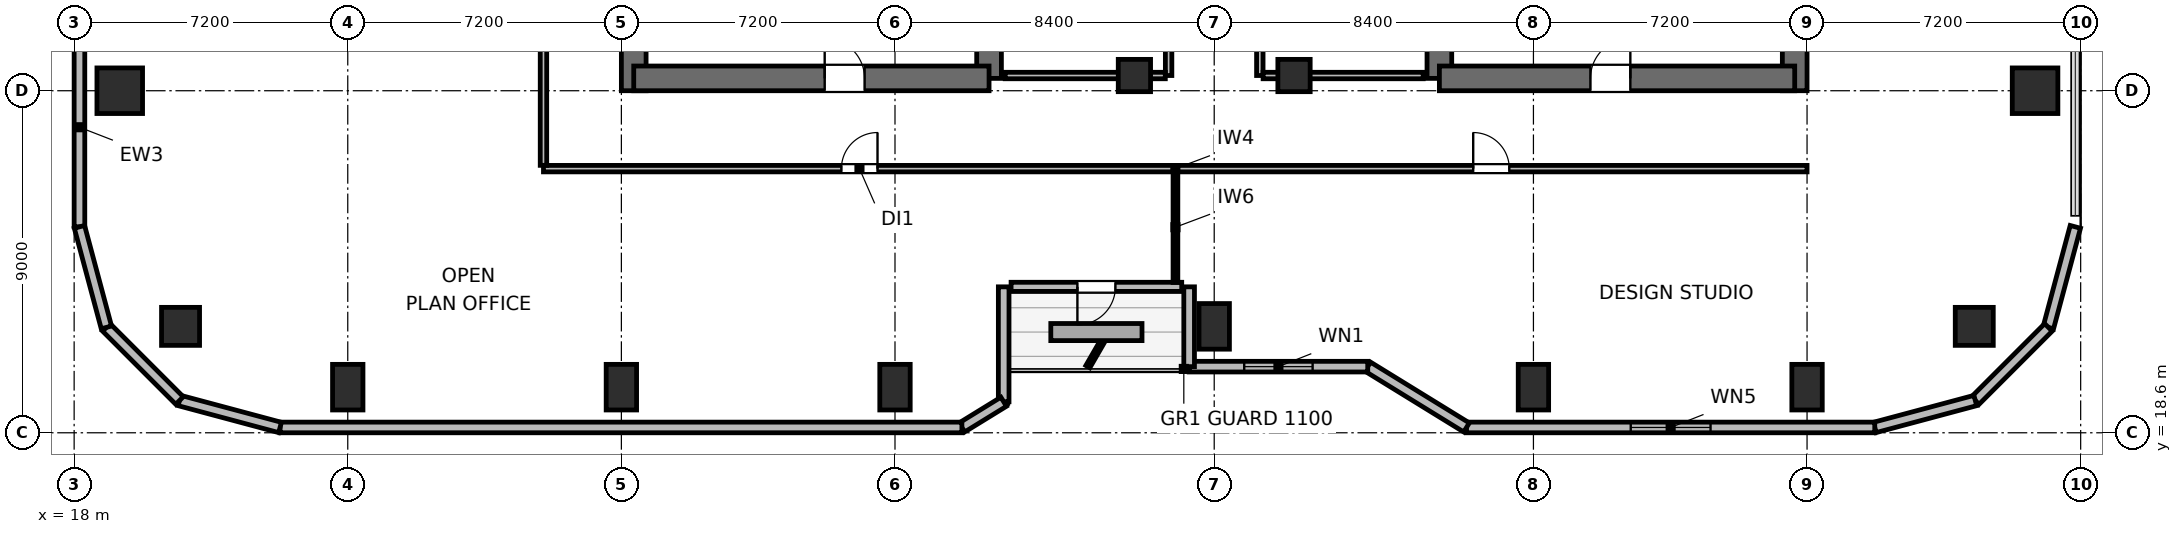
"""IFC4 building model, lengths in metres.
Left out: names, types, materials, properties, quantities, classifications, styles, units other than length and angle.
Written with IfcOpenShell. Run it as: python <this file> out.ifc"""

import sys

from ifc_helpers import new_model, si_unit, direction, frame, frame_2d, origin, origin_2d, place, context, subcontext, project, spatial, rectangle, circle, extrude, element, fill, save


model = new_model("IFC4")
c1 = context("Model", 3, precision=1e-05, world=origin(), true_north=direction((0.0, 1.0)))
c2 = subcontext(c1, "Body", "Model", "MODEL_VIEW")
j1 = project(units=[si_unit("LENGTHUNIT", "METRE"), si_unit("PLANEANGLEUNIT", "RADIAN")], contexts=[c1])
p1 = place(None, origin())
s1 = spatial("IfcSite", under=j1, at=p1, CompositionType="ELEMENT")
p2 = place(p1, origin())
s2 = spatial("IfcBuilding", under=s1, at=p2, CompositionType="ELEMENT")
p3 = place(p2, frame((0.0, 0.0, 181.8)))
s3 = spatial("IfcBuildingStorey", under=s2, at=p3, CompositionType="ELEMENT", Elevation=181.8)
p4 = place(p3, frame((32.725, 27.6, 0.0), z_axis=(0.0, 0.0, 1.0), x_axis=(0.0, 1.0, 0.0)))
e1 = element("IfcWall", 1, at=p4, inside=s3, PredefinedType="SHEAR", context=c2, shape_type="SweptSolid", body=[
    extrude(rectangle(XDim=16.8, YDim=0.65, at=frame_2d((8.4, 0.0))), origin(), (0.0, 0.0, 1.0), 4.5),
])
p5 = place(p3, frame((42.075, 27.925, 0.0), z_axis=(0.0, 0.0, 1.0), x_axis=(0.0, 1.0, 0.0)))
e2 = element("IfcWall", 2, at=p5, inside=s3, PredefinedType="SHEAR", context=c2, shape_type="SweptSolid", body=[
    extrude(rectangle(XDim=6.475, YDim=0.65, at=frame_2d((3.237, 0.0))), origin(), (0.0, 0.0, 1.0), 4.5),
])
p6 = place(p3, frame((32.725, 27.925, 0.0), z_axis=(0.0, 0.0, 1.0), x_axis=(1.0, 0.0, 0.0)))
e3 = element("IfcWall", 3, at=p6, inside=s3, PredefinedType="SHEAR", context=c2, shape_type="SweptSolid", body=[
    extrude(rectangle(XDim=9.35, YDim=0.65, at=frame_2d((4.675, 0.0))), origin(), (0.0, 0.0, 1.0), 4.5),
])
p7 = place(p6, frame((5.025, 0.0, 0.0)))
e4 = element("IfcOpeningElement", 4, at=p7, cuts=e3, PredefinedType="OPENING", context=c2, shape_type="SweptSolid", body=[
    extrude(rectangle(XDim=1.05, YDim=2.04, at=frame_2d((0.525, 1.02))), frame((0.0, 0.335, 0.0), z_axis=(0.0, -1.0, 0.0), x_axis=(1.0, 0.0, 0.0)), (0.0, 0.0, 1.0), 0.67),
])
p8 = place(p3, frame((53.925, 27.925, 0.0), z_axis=(0.0, 0.0, 1.0), x_axis=(0.0, 1.0, 0.0)))
e5 = element("IfcWall", 5, at=p8, inside=s3, PredefinedType="SHEAR", context=c2, shape_type="SweptSolid", body=[
    extrude(rectangle(XDim=7.875, YDim=0.65, at=frame_2d((3.938, 0.0))), origin(), (0.0, 0.0, 1.0), 4.5),
])
p9 = place(p3, frame((63.275, 27.6, 0.0), z_axis=(0.0, 0.0, 1.0), x_axis=(0.0, 1.0, 0.0)))
e6 = element("IfcWall", 6, at=p9, inside=s3, PredefinedType="SHEAR", context=c2, shape_type="SweptSolid", body=[
    extrude(rectangle(XDim=16.8, YDim=0.65, at=frame_2d((8.4, 0.0))), origin(), (0.0, 0.0, 1.0), 4.5),
])
p10 = place(p3, frame((53.925, 27.925, 0.0), z_axis=(0.0, 0.0, 1.0), x_axis=(1.0, 0.0, 0.0)))
e7 = element("IfcWall", 7, at=p10, inside=s3, PredefinedType="SHEAR", context=c2, shape_type="SweptSolid", body=[
    extrude(rectangle(XDim=9.35, YDim=0.65, at=frame_2d((4.675, 0.0))), origin(), (0.0, 0.0, 1.0), 4.5),
])
p11 = place(p10, frame((3.975, 0.0, 0.0)))
e8 = element("IfcOpeningElement", 8, at=p11, cuts=e7, PredefinedType="OPENING", context=c2, shape_type="SweptSolid", body=[
    extrude(rectangle(XDim=1.05, YDim=2.04, at=frame_2d((0.525, 1.02))), frame((0.0, 0.335, 0.0), z_axis=(0.0, -1.0, 0.0), x_axis=(1.0, 0.0, 0.0)), (0.0, 0.0, 1.0), 0.67),
])
for number, where, z_axis, x_axis in (
    (9, (20.8, 21.4, 0.0), (0.0, 0.0, 1.0), (1.0, 0.0, 0.0)),
    (10, (68.0, 21.4, 0.0), (0.0, 0.0, 1.0), (1.0, 0.0, 0.0)),
):
    element("IfcColumn", number, at=place(p3, frame(where, z_axis=z_axis, x_axis=x_axis)), inside=s3, PredefinedType="COLUMN", context=c2, shape_type="SweptSolid", body=[
        extrude(circle(Radius=0.5, at=origin_2d()), origin(), (0.0, 0.0, 1.0), 4.5),
    ])
for number, where, z_axis, x_axis in (
    (11, (25.2, 19.8, 0.0), (0.0, 0.0, 1.0), (1.0, 0.0, 0.0)),
    (12, (32.4, 19.8, 0.0), (0.0, 0.0, 1.0), (1.0, 0.0, 0.0)),
    (13, (39.6, 19.8, 0.0), (0.0, 0.0, 1.0), (1.0, 0.0, 0.0)),
    (14, (48.0, 21.4, 0.0), (0.0, 0.0, 1.0), (1.0, 0.0, 0.0)),
    (15, (56.4, 19.8, 0.0), (0.0, 0.0, 1.0), (1.0, 0.0, 0.0)),
    (16, (63.6, 19.8, 0.0), (0.0, 0.0, 1.0), (1.0, 0.0, 0.0)),
):
    element("IfcColumn", number, at=place(p3, frame(where, z_axis=z_axis, x_axis=x_axis)), inside=s3, PredefinedType="COLUMN", context=c2, shape_type="SweptSolid", body=[
        extrude(rectangle(XDim=0.8, YDim=1.2, at=origin_2d()), origin(), (0.0, 0.0, 1.0), 4.5),
    ])
for number, where, z_axis, x_axis in (
    (17, (19.2, 27.6, 0.0), (0.0, 0.0, 1.0), (1.0, 0.0, 0.0)),
    (18, (69.6, 27.6, 0.0), (0.0, 0.0, 1.0), (1.0, 0.0, 0.0)),
):
    element("IfcColumn", number, at=place(p3, frame(where, z_axis=z_axis, x_axis=x_axis)), inside=s3, PredefinedType="COLUMN", context=c2, shape_type="SweptSolid", body=[
        extrude(rectangle(XDim=1.2, YDim=1.2, at=origin_2d()), origin(), (0.0, 0.0, 1.0), 4.5),
    ])
for number, where, z_axis, x_axis in (
    (19, (45.9, 28.0, 0.0), (0.0, 0.0, 1.0), (1.0, 0.0, 0.0)),
    (20, (50.1, 28.0, 0.0), (0.0, 0.0, 1.0), (1.0, 0.0, 0.0)),
):
    element("IfcColumn", number, at=place(p3, frame(where, z_axis=z_axis, x_axis=x_axis)), inside=s3, PredefinedType="COLUMN", context=c2, shape_type="SweptSolid", body=[
        extrude(rectangle(XDim=0.85, YDim=0.85, at=origin_2d()), origin(), (0.0, 0.0, 1.0), 4.5),
    ])
p12 = place(p3, frame((18.14, 24.018, 0.0), z_axis=(0.0, 0.0, 1.0), x_axis=(0.0, 1.0, 0.0)))
e21 = element("IfcWall", 21, at=p12, inside=s3, PredefinedType="SOLIDWALL", context=c2, shape_type="SweptSolid", body=[
    extrude(rectangle(XDim=5.242, YDim=0.28, at=frame_2d((2.621, 0.0))), origin(), (0.0, 0.0, 1.0), 4.28),
])
p13 = place(p3, frame((70.66, 24.018, 0.0), z_axis=(0.0, 0.0, 1.0), x_axis=(-0.258672222976, -0.9659651552, 0.0)))
e22 = element("IfcWall", 22, at=p13, inside=s3, PredefinedType="SOLIDWALL", context=c2, shape_type="SweptSolid", body=[
    extrude(rectangle(XDim=2.739, YDim=0.28, at=frame_2d((1.37, 0.0))), origin(), (0.0, 0.0, 1.0), 4.28),
])
p14 = place(p3, frame((69.951, 21.373, 0.0), z_axis=(0.0, 0.0, 1.0), x_axis=(-0.707061915429, -0.707151644098, 0.0)))
e23 = element("IfcWall", 23, at=p14, inside=s3, PredefinedType="SOLIDWALL", context=c2, shape_type="SweptSolid", body=[
    extrude(rectangle(XDim=2.721, YDim=0.28, at=frame_2d((1.36, 0.0))), origin(), (0.0, 0.0, 1.0), 4.28),
])
p15 = place(p3, frame((68.028, 19.448, 0.0), z_axis=(0.0, 0.0, 1.0), x_axis=(-0.965971118627, -0.258649952598, 0.0)))
e24 = element("IfcWall", 24, at=p15, inside=s3, PredefinedType="SOLIDWALL", context=c2, shape_type="SweptSolid", body=[
    extrude(rectangle(XDim=2.739, YDim=0.28, at=frame_2d((1.37, 0.0))), origin(), (0.0, 0.0, 1.0), 4.28),
])
p16 = place(p3, frame((65.382, 18.74, 0.0), z_axis=(0.0, 0.0, 1.0), x_axis=(-1.0, 0.0, 0.0)))
e25 = element("IfcWall", 25, at=p16, inside=s3, PredefinedType="SOLIDWALL", context=c2, shape_type="SweptSolid", body=[
    extrude(rectangle(XDim=10.742, YDim=0.28, at=frame_2d((5.371, 0.0))), origin(), (0.0, 0.0, 1.0), 4.28),
])
p17 = place(p16, frame((4.321, 0.0, 0.85)))
e26 = element("IfcOpeningElement", 26, at=p17, cuts=e25, PredefinedType="OPENING", context=c2, shape_type="SweptSolid", body=[
    extrude(rectangle(XDim=2.1, YDim=1.05, at=frame_2d((1.05, 0.525))), frame((0.0, 0.15, 0.0), z_axis=(0.0, -1.0, 0.0), x_axis=(1.0, 0.0, 0.0)), (0.0, 0.0, 1.0), 0.3),
])
p18 = place(p3, frame((54.64, 18.74, 0.0), z_axis=(0.0, 0.0, 1.0), x_axis=(-0.851652825334, 0.524106349037, 0.0)))
e27 = element("IfcWall", 27, at=p18, inside=s3, PredefinedType="SOLIDWALL", context=c2, shape_type="SweptSolid", body=[
    extrude(rectangle(XDim=3.053, YDim=0.28, at=frame_2d((1.526, 0.0))), origin(), (0.0, 0.0, 1.0), 2.865),
])
p19 = place(p3, frame((52.04, 20.34, 0.0), z_axis=(0.0, 0.0, 1.0), x_axis=(-1.0, 0.0, 0.0)))
e28 = element("IfcWall", 28, at=p19, inside=s3, PredefinedType="SOLIDWALL", context=c2, shape_type="SweptSolid", body=[
    extrude(rectangle(XDim=4.699, YDim=0.28, at=frame_2d((2.35, 0.0))), origin(), (0.0, 0.0, 1.0), 2.865),
])
p20 = place(p19, frame((1.45, 0.0, 0.85)))
e29 = element("IfcOpeningElement", 29, at=p20, cuts=e28, PredefinedType="OPENING", context=c2, shape_type="SweptSolid", body=[
    extrude(rectangle(XDim=1.8, YDim=1.1, at=frame_2d((0.9, 0.55))), frame((0.0, 0.15, 0.0), z_axis=(0.0, -1.0, 0.0), x_axis=(1.0, 0.0, 0.0)), (0.0, 0.0, 1.0), 0.3),
])
p21 = place(p3, frame((47.34, 20.34, 0.0), z_axis=(0.0, 0.0, 1.0), x_axis=(0.0, 1.0, 0.0)))
e30 = element("IfcWall", 30, at=p21, inside=s3, PredefinedType="SOLIDWALL", context=c2, shape_type="SweptSolid", body=[
    extrude(rectangle(XDim=2.1, YDim=0.28, at=frame_2d((1.05, 0.0))), origin(), (0.0, 0.0, 1.0), 2.865),
])
p22 = place(p3, frame((47.145, 22.44, 0.0), z_axis=(0.0, 0.0, 1.0), x_axis=(-1.0, 0.0, 0.0)))
e31 = element("IfcWall", 31, at=p22, inside=s3, PredefinedType="SOLIDWALL", context=c2, shape_type="SweptSolid", body=[
    extrude(rectangle(XDim=4.49, YDim=0.24, at=frame_2d((2.245, 0.0))), origin(), (0.0, 0.0, 1.0), 4.28),
])
p23 = place(p22, frame((1.745, 0.0, 0.0)))
e32 = element("IfcOpeningElement", 32, at=p23, cuts=e31, PredefinedType="OPENING", context=c2, shape_type="SweptSolid", body=[
    extrude(rectangle(XDim=1.0, YDim=2.02, at=frame_2d((0.5, 1.01))), frame((0.0, 0.13, 0.0), z_axis=(0.0, -1.0, 0.0), x_axis=(1.0, 0.0, 0.0)), (0.0, 0.0, 1.0), 0.26),
])
p24 = place(p3, frame((42.46, 22.44, 0.0), z_axis=(0.0, 0.0, 1.0), x_axis=(0.0, -1.0, 0.0)))
e33 = element("IfcWall", 33, at=p24, inside=s3, PredefinedType="SOLIDWALL", context=c2, shape_type="SweptSolid", body=[
    extrude(rectangle(XDim=3.024, YDim=0.28, at=frame_2d((1.512, 0.0))), origin(), (0.0, 0.0, 1.0), 2.865),
])
p25 = place(p3, frame((42.46, 19.416, 0.0), z_axis=(0.0, 0.0, 1.0), x_axis=(-0.851801140441, -0.523865266212, 0.0)))
e34 = element("IfcWall", 34, at=p25, inside=s3, PredefinedType="SOLIDWALL", context=c2, shape_type="SweptSolid", body=[
    extrude(rectangle(XDim=1.291, YDim=0.28, at=frame_2d((0.646, 0.0))), origin(), (0.0, 0.0, 1.0), 4.28),
])
p26 = place(p3, frame((41.36, 18.74, 0.0), z_axis=(0.0, 0.0, 1.0), x_axis=(-1.0, 0.0, 0.0)))
e35 = element("IfcWall", 35, at=p26, inside=s3, PredefinedType="SOLIDWALL", context=c2, shape_type="SweptSolid", body=[
    extrude(rectangle(XDim=17.942, YDim=0.28, at=frame_2d((8.971, 0.0))), origin(), (0.0, 0.0, 1.0), 4.28),
])
p27 = place(p3, frame((23.418, 18.74, 0.0), z_axis=(0.0, 0.0, 1.0), x_axis=(-0.965971118627, 0.258649952598, 0.0)))
e36 = element("IfcWall", 36, at=p27, inside=s3, PredefinedType="SOLIDWALL", context=c2, shape_type="SweptSolid", body=[
    extrude(rectangle(XDim=2.739, YDim=0.28, at=frame_2d((1.37, 0.0))), origin(), (0.0, 0.0, 1.0), 4.28),
])
p28 = place(p3, frame((20.772, 19.448, 0.0), z_axis=(0.0, 0.0, 1.0), x_axis=(-0.707106781187, 0.707106781187, 0.0)))
e37 = element("IfcWall", 37, at=p28, inside=s3, PredefinedType="SOLIDWALL", context=c2, shape_type="SweptSolid", body=[
    extrude(rectangle(XDim=2.721, YDim=0.28, at=frame_2d((1.36, 0.0))), origin(), (0.0, 0.0, 1.0), 4.28),
])
p29 = place(p3, frame((18.848, 21.373, 0.0), z_axis=(0.0, 0.0, 1.0), x_axis=(-0.258672222976, 0.9659651552, 0.0)))
e38 = element("IfcWall", 38, at=p29, inside=s3, PredefinedType="SOLIDWALL", context=c2, shape_type="SweptSolid", body=[
    extrude(rectangle(XDim=2.739, YDim=0.28, at=frame_2d((1.37, 0.0))), origin(), (0.0, 0.0, 1.0), 4.28),
])
p30 = place(p3, frame((46.8, 28.0, 0.0), z_axis=(0.0, 0.0, 1.0), x_axis=(0.0, 1.0, 0.0)))
e39 = element("IfcWall", 39, at=p30, inside=s3, PredefinedType="PARTITIONING", context=c2, shape_type="SweptSolid", body=[
    extrude(rectangle(XDim=4.5, YDim=0.17, at=frame_2d((2.25, 0.0))), origin(), (0.0, 0.0, 1.0), 4.28),
])
p31 = place(p30, frame((0.675, 0.0, 0.0)))
e40 = element("IfcOpeningElement", 40, at=p31, cuts=e39, PredefinedType="OPENING", context=c2, shape_type="SweptSolid", body=[
    extrude(rectangle(XDim=0.9, YDim=2.02, at=frame_2d((0.45, 1.01))), frame((0.0, 0.095, 0.0), z_axis=(0.0, -1.0, 0.0), x_axis=(1.0, 0.0, 0.0)), (0.0, 0.0, 1.0), 0.19),
])
p32 = place(p30, frame((2.925, 0.0, 0.0)))
e41 = element("IfcOpeningElement", 41, at=p32, cuts=e39, PredefinedType="OPENING", context=c2, shape_type="SweptSolid", body=[
    extrude(rectangle(XDim=0.9, YDim=2.02, at=frame_2d((0.45, 1.01))), frame((0.0, 0.095, 0.0), z_axis=(0.0, -1.0, 0.0), x_axis=(1.0, 0.0, 0.0)), (0.0, 0.0, 1.0), 0.19),
])
p33 = place(p3, frame((42.5, 28.0, 0.0), z_axis=(0.0, 0.0, 1.0), x_axis=(1.0, 0.0, 0.0)))
e42 = element("IfcWall", 42, at=p33, inside=s3, PredefinedType="PARTITIONING", context=c2, shape_type="SweptSolid", body=[
    extrude(rectangle(XDim=4.213, YDim=0.17, at=frame_2d((2.106, 0.0))), origin(), (0.0, 0.0, 1.0), 3.365),
])
p34 = place(p3, frame((49.2, 28.0, 0.0), z_axis=(0.0, 0.0, 1.0), x_axis=(0.0, 1.0, 0.0)))
e43 = element("IfcWall", 43, at=p34, inside=s3, PredefinedType="PARTITIONING", context=c2, shape_type="SweptSolid", body=[
    extrude(rectangle(XDim=4.5, YDim=0.17, at=frame_2d((2.25, 0.0))), origin(), (0.0, 0.0, 1.0), 4.28),
])
p35 = place(p34, frame((1.8, 0.0, 0.0)))
e44 = element("IfcOpeningElement", 44, at=p35, cuts=e43, PredefinedType="OPENING", context=c2, shape_type="SweptSolid", body=[
    extrude(rectangle(XDim=0.9, YDim=2.02, at=frame_2d((0.45, 1.01))), frame((0.0, 0.095, 0.0), z_axis=(0.0, -1.0, 0.0), x_axis=(1.0, 0.0, 0.0)), (0.0, 0.0, 1.0), 0.19),
])
p36 = place(p3, frame((49.287, 28.0, 0.0), z_axis=(0.0, 0.0, 1.0), x_axis=(1.0, 0.0, 0.0)))
e45 = element("IfcWall", 45, at=p36, inside=s3, PredefinedType="PARTITIONING", context=c2, shape_type="SweptSolid", body=[
    extrude(rectangle(XDim=4.213, YDim=0.17, at=frame_2d((2.106, 0.0))), origin(), (0.0, 0.0, 1.0), 3.365),
])
p37 = place(p3, frame((30.35, 25.55, 0.0), z_axis=(0.0, 0.0, 1.0), x_axis=(1.0, 0.0, 0.0)))
e46 = element("IfcWall", 46, at=p37, inside=s3, PredefinedType="PARTITIONING", context=c2, shape_type="SweptSolid", body=[
    extrude(rectangle(XDim=33.25, YDim=0.17, at=frame_2d((16.625, 0.0))), origin(), (0.0, 0.0, 1.0), 4.28),
])
p38 = place(p37, frame((7.84, 0.0, 0.0)))
e47 = element("IfcOpeningElement", 47, at=p38, cuts=e46, PredefinedType="OPENING", context=c2, shape_type="SweptSolid", body=[
    extrude(rectangle(XDim=0.95, YDim=2.04, at=frame_2d((0.475, 1.02))), frame((0.0, 0.095, 0.0), z_axis=(0.0, -1.0, 0.0), x_axis=(1.0, 0.0, 0.0)), (0.0, 0.0, 1.0), 0.19),
])
p39 = place(p37, frame((24.465, 0.0, 0.0)))
e48 = element("IfcOpeningElement", 48, at=p39, cuts=e46, PredefinedType="OPENING", context=c2, shape_type="SweptSolid", body=[
    extrude(rectangle(XDim=0.95, YDim=2.04, at=frame_2d((0.475, 1.02))), frame((0.0, 0.095, 0.0), z_axis=(0.0, -1.0, 0.0), x_axis=(1.0, 0.0, 0.0)), (0.0, 0.0, 1.0), 0.19),
])
p40 = place(p3, frame((30.35, 25.637, 0.0), z_axis=(0.0, 0.0, 1.0), x_axis=(0.0, 1.0, 0.0)))
e49 = element("IfcWall", 49, at=p40, inside=s3, PredefinedType="PARTITIONING", context=c2, shape_type="SweptSolid", body=[
    extrude(rectangle(XDim=8.763, YDim=0.17, at=frame_2d((4.381, 0.0))), origin(), (0.0, 0.0, 1.0), 4.28),
])
p41 = place(p40, frame((3.863, 0.0, 0.0)))
e50 = element("IfcOpeningElement", 50, at=p41, cuts=e49, PredefinedType="OPENING", context=c2, shape_type="SweptSolid", body=[
    extrude(rectangle(XDim=0.95, YDim=2.04, at=frame_2d((0.475, 1.02))), frame((0.0, 0.095, 0.0), z_axis=(0.0, -1.0, 0.0), x_axis=(1.0, 0.0, 0.0)), (0.0, 0.0, 1.0), 0.19),
])
p42 = place(p3, frame((46.98, 22.555, 0.0), z_axis=(0.0, 0.0, 1.0), x_axis=(0.0, 1.0, 0.0)))
e51 = element("IfcWall", 51, at=p42, inside=s3, PredefinedType="PARTITIONING", context=c2, shape_type="SweptSolid", body=[
    extrude(rectangle(XDim=2.908, YDim=0.125, at=frame_2d((1.454, 0.0))), origin(), (0.0, 0.0, 1.0), 4.28),
])
p43 = place(p17, origin())
e52 = element("IfcWindow", 52, at=p43, inside=s3, PartitioningType="SINGLE_PANEL", PredefinedType="WINDOW", context=c2, shape_type="SweptSolid", body=[
    extrude(rectangle(XDim=2.1, YDim=1.05, at=frame_2d((1.05, 0.525))), frame((0.0, 0.03, 0.0), z_axis=(0.0, -1.0, 0.0), x_axis=(1.0, 0.0, 0.0)), (0.0, 0.0, 1.0), 0.06),
])
fill(e26, e52)
p44 = place(p20, origin())
e53 = element("IfcWindow", 53, at=p44, inside=s3, PartitioningType="SINGLE_PANEL", PredefinedType="WINDOW", context=c2, shape_type="SweptSolid", body=[
    extrude(rectangle(XDim=1.8, YDim=1.1, at=frame_2d((0.9, 0.55))), frame((0.0, 0.03, 0.0), z_axis=(0.0, -1.0, 0.0), x_axis=(1.0, 0.0, 0.0)), (0.0, 0.0, 1.0), 0.06),
])
fill(e29, e53)
p45 = place(p23, origin())
e54 = element("IfcDoor", 54, at=p45, inside=s3, OperationType="SINGLE_SWING_RIGHT", PredefinedType="DOOR", context=c2, shape_type="SweptSolid", body=[
    extrude(rectangle(XDim=1.0, YDim=2.02, at=frame_2d((0.5, 1.01))), frame((0.0, 0.025, 0.0), z_axis=(0.0, -1.0, 0.0), x_axis=(1.0, 0.0, 0.0)), (0.0, 0.0, 1.0), 0.05),
])
fill(e32, e54)
p46 = place(p7, origin())
e55 = element("IfcDoor", 55, at=p46, inside=s3, OperationType="SINGLE_SWING_LEFT", PredefinedType="DOOR", context=c2, shape_type="SweptSolid", body=[
    extrude(rectangle(XDim=1.05, YDim=2.04, at=frame_2d((0.525, 1.02))), frame((0.0, 0.025, 0.0), z_axis=(0.0, -1.0, 0.0), x_axis=(1.0, 0.0, 0.0)), (0.0, 0.0, 1.0), 0.05),
])
fill(e4, e55)
p47 = place(p11, origin())
e56 = element("IfcDoor", 56, at=p47, inside=s3, OperationType="SINGLE_SWING_RIGHT", PredefinedType="DOOR", context=c2, shape_type="SweptSolid", body=[
    extrude(rectangle(XDim=1.05, YDim=2.04, at=frame_2d((0.525, 1.02))), frame((0.0, 0.025, 0.0), z_axis=(0.0, -1.0, 0.0), x_axis=(1.0, 0.0, 0.0)), (0.0, 0.0, 1.0), 0.05),
])
fill(e8, e56)
p48 = place(p38, origin())
e57 = element("IfcDoor", 57, at=p48, inside=s3, OperationType="SINGLE_SWING_RIGHT", PredefinedType="DOOR", context=c2, shape_type="SweptSolid", body=[
    extrude(rectangle(XDim=0.95, YDim=2.04, at=frame_2d((0.475, 1.02))), frame((0.0, 0.025, 0.0), z_axis=(0.0, -1.0, 0.0), x_axis=(1.0, 0.0, 0.0)), (0.0, 0.0, 1.0), 0.05),
])
fill(e47, e57)
p49 = place(p39, origin())
e58 = element("IfcDoor", 58, at=p49, inside=s3, OperationType="SINGLE_SWING_LEFT", PredefinedType="DOOR", context=c2, shape_type="SweptSolid", body=[
    extrude(rectangle(XDim=0.95, YDim=2.04, at=frame_2d((0.475, 1.02))), frame((0.0, 0.025, 0.0), z_axis=(0.0, -1.0, 0.0), x_axis=(1.0, 0.0, 0.0)), (0.0, 0.0, 1.0), 0.05),
])
fill(e48, e58)
save(model, sys.argv[1])
